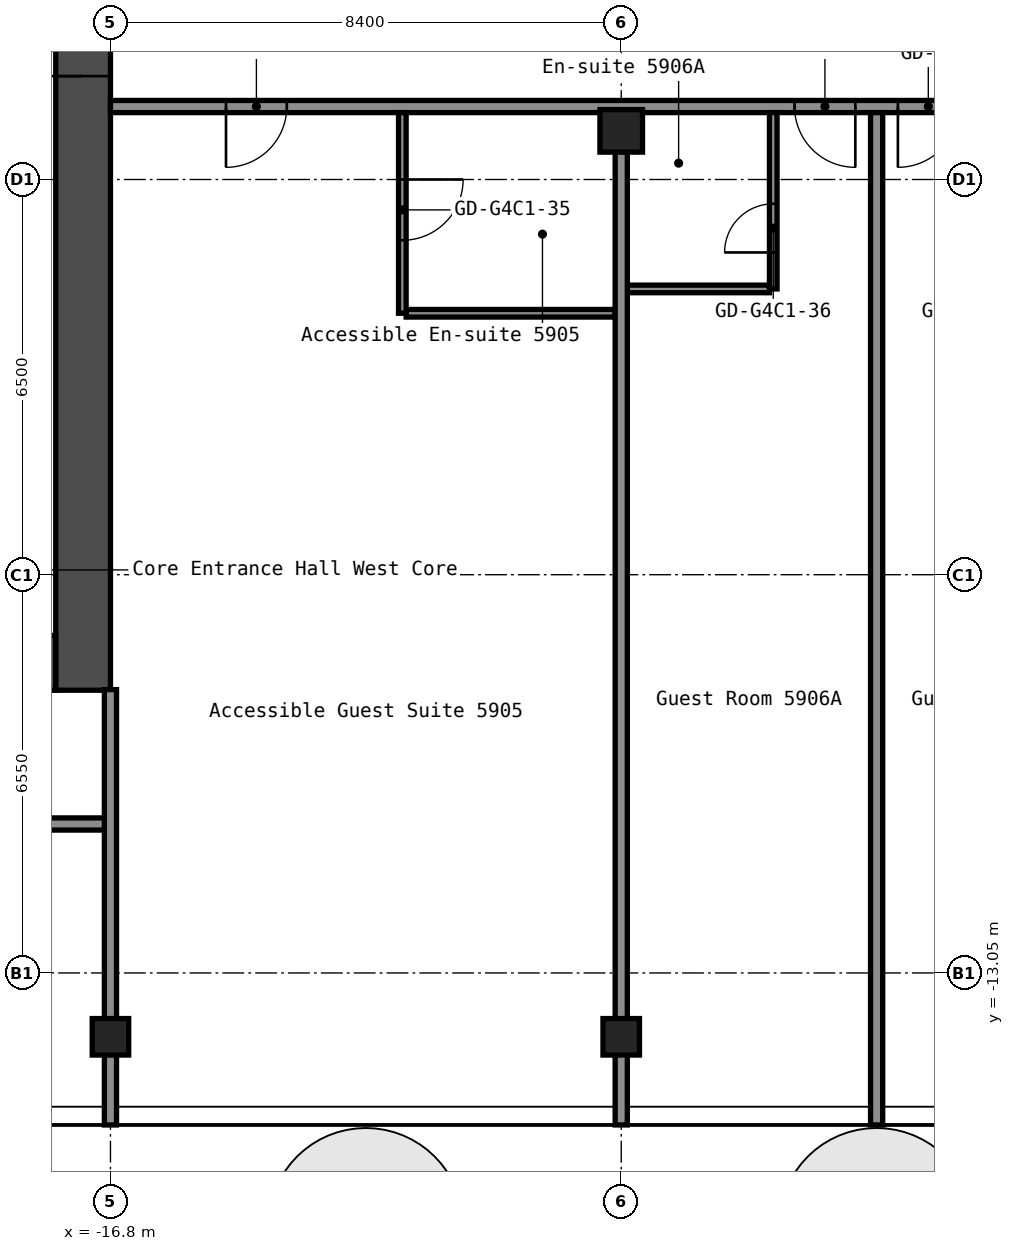
"""IFC4 building model, lengths in metres.
Left out: names, types, materials, properties, quantities, classifications, styles, units other than length and angle.
Written with IfcOpenShell. Run it as: python <this file> out.ifc"""

import sys

from ifc_helpers import new_model, si_unit, direction, frame, frame_2d, origin, origin_2d, place, context, subcontext, project, spatial, rectangle, hollow_rectangle, extrude, element, fill, save


model = new_model("IFC4")
c1 = context("Model", 3, precision=1e-05, world=origin(), true_north=direction((0.0, 1.0)))
c2 = subcontext(c1, "Body", "Model", "MODEL_VIEW")
j1 = project(units=[si_unit("LENGTHUNIT", "METRE"), si_unit("PLANEANGLEUNIT", "RADIAN")], contexts=[c1])
p1 = place(None, origin())
s1 = spatial("IfcSite", under=j1, at=p1, CompositionType="ELEMENT")
p2 = place(p1, origin())
s2 = spatial("IfcBuilding", under=s1, at=p2, CompositionType="ELEMENT")
p3 = place(p2, frame((0.0, 0.0, 209.0)))
s3 = spatial("IfcBuildingStorey", under=s2, at=p3, CompositionType="ELEMENT", Elevation=209.0)
for number, where, z_axis, x_axis in (
    (1, (-16.8, -14.1, 0.0), (0.0, 0.0, 1.0), (1.0, 0.0, 0.0)),
    (2, (-8.4, -14.1, 0.0), (0.0, 0.0, 1.0), (1.0, 0.0, 0.0)),
):
    element("IfcColumn", number, at=place(p3, frame(where, z_axis=z_axis, x_axis=x_axis)), inside=s3, PredefinedType="COLUMN", context=c2, shape_type="SweptSolid", body=[
        extrude(hollow_rectangle(XDim=0.6, YDim=0.6, WallThickness=0.025, InnerFilletRadius=0.038, OuterFilletRadius=0.062, at=origin_2d()), origin(), (0.0, 0.0, 1.0), 2.75),
    ])
p4 = place(p3, frame((-8.4, 0.8, 0.0), z_axis=(0.0, 0.0, 1.0), x_axis=(1.0, 0.0, 0.0)))
e3 = element("IfcColumn", 3, at=p4, inside=s3, PredefinedType="COLUMN", context=c2, shape_type="SweptSolid", body=[
    extrude(hollow_rectangle(XDim=0.7, YDim=0.7, WallThickness=0.028, at=origin_2d()), origin(), (0.0, 0.0, 1.0), 2.75),
])
p5 = place(p3, frame((-17.25, -8.4, 0.0), z_axis=(0.0, 0.0, 1.0), x_axis=(0.0, 1.0, 0.0)))
e4 = element("IfcWall", 4, at=p5, inside=s3, PredefinedType="SHEAR", context=c2, shape_type="SweptSolid", body=[
    extrude(rectangle(XDim=16.8, YDim=0.9, at=frame_2d((8.4, 0.0))), origin(), (0.0, 0.0, 1.0), 2.75),
])
p6 = place(p5, frame((10.1, 0.0, 0.0)))
e5 = element("IfcOpeningElement", 5, at=p6, cuts=e4, PredefinedType="OPENING", context=c2, shape_type="SweptSolid", body=[
    extrude(rectangle(XDim=1.6, YDim=2.1, at=frame_2d((0.8, 1.05))), frame((0.0, 0.46, 0.0), z_axis=(0.0, -1.0, 0.0), x_axis=(1.0, 0.0, 0.0)), (0.0, 0.0, 1.0), 0.92),
])
p7 = place(p3, frame((-32.7, -7.95, 0.0), z_axis=(0.0, 0.0, 1.0), x_axis=(1.0, 0.0, 0.0)))
e6 = element("IfcWall", 6, at=p7, inside=s3, PredefinedType="SHEAR", context=c2, shape_type="SweptSolid", body=[
    extrude(rectangle(XDim=15.0, YDim=0.9, at=frame_2d((7.5, 0.0))), origin(), (0.0, 0.0, 1.0), 2.75),
])
p8 = place(p7, frame((11.45, 0.0, 0.0)))
e7 = element("IfcOpeningElement", 7, at=p8, cuts=e6, PredefinedType="OPENING", context=c2, shape_type="SweptSolid", body=[
    extrude(rectangle(XDim=1.0, YDim=2.1, at=frame_2d((0.5, 1.05))), frame((0.0, 0.46, 0.0), z_axis=(0.0, -1.0, 0.0), x_axis=(1.0, 0.0, 0.0)), (0.0, 0.0, 1.0), 0.92),
])
p9 = place(p3, frame((-38.1, -10.6, 0.0), z_axis=(0.0, 0.0, 1.0), x_axis=(1.0, 0.0, 0.0)))
e8 = element("IfcWall", 8, at=p9, inside=s3, PredefinedType="PARTITIONING", context=c2, shape_type="SweptSolid", body=[
    extrude(rectangle(XDim=21.3, YDim=0.2, at=frame_2d((10.65, 0.0))), origin(), (0.0, 0.0, 1.0), 2.75),
])
p10 = place(p9, frame((1.95, 0.0, 0.0)))
e9 = element("IfcOpeningElement", 9, at=p10, cuts=e8, PredefinedType="OPENING", context=c2, shape_type="SweptSolid", body=[
    extrude(rectangle(XDim=0.9, YDim=2.1, at=frame_2d((0.45, 1.05))), frame((0.0, 0.11, 0.0), z_axis=(0.0, -1.0, 0.0), x_axis=(1.0, 0.0, 0.0)), (0.0, 0.0, 1.0), 0.22),
])
p11 = place(p9, frame((5.56, 0.0, 0.0)))
e10 = element("IfcOpeningElement", 10, at=p11, cuts=e8, PredefinedType="OPENING", context=c2, shape_type="SweptSolid", body=[
    extrude(rectangle(XDim=0.9, YDim=2.1, at=frame_2d((0.45, 1.05))), frame((0.0, 0.11, 0.0), z_axis=(0.0, -1.0, 0.0), x_axis=(1.0, 0.0, 0.0)), (0.0, 0.0, 1.0), 0.22),
])
p12 = place(p9, frame((9.76, 0.0, 0.0)))
e11 = element("IfcOpeningElement", 11, at=p12, cuts=e8, PredefinedType="OPENING", context=c2, shape_type="SweptSolid", body=[
    extrude(rectangle(XDim=0.9, YDim=2.1, at=frame_2d((0.45, 1.05))), frame((0.0, 0.11, 0.0), z_axis=(0.0, -1.0, 0.0), x_axis=(1.0, 0.0, 0.0)), (0.0, 0.0, 1.0), 0.22),
])
p13 = place(p9, frame((16.6, 0.0, 0.0)))
e12 = element("IfcOpeningElement", 12, at=p13, cuts=e8, PredefinedType="OPENING", context=c2, shape_type="SweptSolid", body=[
    extrude(rectangle(XDim=1.0, YDim=2.1, at=frame_2d((0.5, 1.05))), frame((0.0, 0.11, 0.0), z_axis=(0.0, -1.0, 0.0), x_axis=(1.0, 0.0, 0.0)), (0.0, 0.0, 1.0), 0.22),
])
p14 = place(p3, frame((-11.938, -2.2, 0.0), z_axis=(0.0, 0.0, 1.0), x_axis=(1.0, 0.0, 0.0)))
e13 = element("IfcWall", 13, at=p14, inside=s3, PredefinedType="PARTITIONING", context=c2, shape_type="SweptSolid", body=[
    extrude(rectangle(XDim=3.438, YDim=0.125, at=frame_2d((1.719, 0.0))), origin(), (0.0, 0.0, 1.0), 2.75),
])
p15 = place(p3, frame((-8.3, -1.8, 0.0), z_axis=(0.0, 0.0, 1.0), x_axis=(1.0, 0.0, 0.0)))
e14 = element("IfcWall", 14, at=p15, inside=s3, PredefinedType="PARTITIONING", context=c2, shape_type="SweptSolid", body=[
    extrude(rectangle(XDim=2.338, YDim=0.125, at=frame_2d((1.169, 0.0))), origin(), (0.0, 0.0, 1.0), 2.75),
])
p16 = place(p3, frame((-16.8, 1.2, 0.0), z_axis=(0.0, 0.0, 1.0), x_axis=(1.0, 0.0, 0.0)))
e15 = element("IfcWall", 15, at=p16, inside=s3, PredefinedType="PARTITIONING", context=c2, shape_type="SweptSolid", body=[
    extrude(rectangle(XDim=33.6, YDim=0.2, at=frame_2d((16.8, 0.0))), origin(), (0.0, 0.0, 1.0), 2.75),
])
p17 = place(p16, frame((1.9, 0.0, 0.0)))
e16 = element("IfcOpeningElement", 16, at=p17, cuts=e15, PredefinedType="OPENING", context=c2, shape_type="SweptSolid", body=[
    extrude(rectangle(XDim=1.0, YDim=2.1, at=frame_2d((0.5, 1.05))), frame((0.0, 0.11, 0.0), z_axis=(0.0, -1.0, 0.0), x_axis=(1.0, 0.0, 0.0)), (0.0, 0.0, 1.0), 0.22),
])
p18 = place(p16, frame((11.25, 0.0, 0.0)))
e17 = element("IfcOpeningElement", 17, at=p18, cuts=e15, PredefinedType="OPENING", context=c2, shape_type="SweptSolid", body=[
    extrude(rectangle(XDim=1.0, YDim=2.1, at=frame_2d((0.5, 1.05))), frame((0.0, 0.11, 0.0), z_axis=(0.0, -1.0, 0.0), x_axis=(1.0, 0.0, 0.0)), (0.0, 0.0, 1.0), 0.22),
])
p19 = place(p16, frame((12.95, 0.0, 0.0)))
e18 = element("IfcOpeningElement", 18, at=p19, cuts=e15, PredefinedType="OPENING", context=c2, shape_type="SweptSolid", body=[
    extrude(rectangle(XDim=1.0, YDim=2.1, at=frame_2d((0.5, 1.05))), frame((0.0, 0.11, 0.0), z_axis=(0.0, -1.0, 0.0), x_axis=(1.0, 0.0, 0.0)), (0.0, 0.0, 1.0), 0.22),
])
p20 = place(p16, frame((19.04, 0.0, 0.0)))
e19 = element("IfcOpeningElement", 19, at=p20, cuts=e15, PredefinedType="OPENING", context=c2, shape_type="SweptSolid", body=[
    extrude(rectangle(XDim=0.9, YDim=2.1, at=frame_2d((0.45, 1.05))), frame((0.0, 0.11, 0.0), z_axis=(0.0, -1.0, 0.0), x_axis=(1.0, 0.0, 0.0)), (0.0, 0.0, 1.0), 0.22),
])
p21 = place(p16, frame((23.24, 0.0, 0.0)))
e20 = element("IfcOpeningElement", 20, at=p21, cuts=e15, PredefinedType="OPENING", context=c2, shape_type="SweptSolid", body=[
    extrude(rectangle(XDim=0.9, YDim=2.1, at=frame_2d((0.45, 1.05))), frame((0.0, 0.11, 0.0), z_axis=(0.0, -1.0, 0.0), x_axis=(1.0, 0.0, 0.0)), (0.0, 0.0, 1.0), 0.22),
])
p22 = place(p16, frame((28.05, 0.0, 0.0)))
e21 = element("IfcOpeningElement", 21, at=p22, cuts=e15, PredefinedType="OPENING", context=c2, shape_type="SweptSolid", body=[
    extrude(rectangle(XDim=1.0, YDim=2.1, at=frame_2d((0.5, 1.05))), frame((0.0, 0.11, 0.0), z_axis=(0.0, -1.0, 0.0), x_axis=(1.0, 0.0, 0.0)), (0.0, 0.0, 1.0), 0.22),
])
p23 = place(p16, frame((29.75, 0.0, 0.0)))
e22 = element("IfcOpeningElement", 22, at=p23, cuts=e15, PredefinedType="OPENING", context=c2, shape_type="SweptSolid", body=[
    extrude(rectangle(XDim=1.0, YDim=2.1, at=frame_2d((0.5, 1.05))), frame((0.0, 0.11, 0.0), z_axis=(0.0, -1.0, 0.0), x_axis=(1.0, 0.0, 0.0)), (0.0, 0.0, 1.0), 0.22),
])
p24 = place(p3, frame((-16.8, -15.55, 0.0), z_axis=(0.0, 0.0, 1.0), x_axis=(0.0, 1.0, 0.0)))
e23 = element("IfcWall", 23, at=p24, inside=s3, PredefinedType="PARTITIONING", context=c2, shape_type="SweptSolid", body=[
    extrude(rectangle(XDim=7.16, YDim=0.2, at=frame_2d((3.58, 0.0))), origin(), (0.0, 0.0, 1.0), 2.75),
])
p25 = place(p3, frame((-12.0, -2.2, 0.0), z_axis=(0.0, 0.0, 1.0), x_axis=(0.0, 1.0, 0.0)))
e24 = element("IfcWall", 24, at=p25, inside=s3, PredefinedType="PARTITIONING", context=c2, shape_type="SweptSolid", body=[
    extrude(rectangle(XDim=3.3, YDim=0.125, at=frame_2d((1.65, 0.0))), origin(), (0.0, 0.0, 1.0), 2.75),
])
p26 = place(p25, frame((1.2, 0.0, 0.0)))
e25 = element("IfcOpeningElement", 25, at=p26, cuts=e24, PredefinedType="OPENING", context=c2, shape_type="SweptSolid", body=[
    extrude(rectangle(XDim=1.0, YDim=2.1, at=frame_2d((0.5, 1.05))), frame((0.0, 0.073, 0.0), z_axis=(0.0, -1.0, 0.0), x_axis=(1.0, 0.0, 0.0)), (0.0, 0.0, 1.0), 0.145),
])
p27 = place(p3, frame((-8.4, -15.55, 0.0), z_axis=(0.0, 0.0, 1.0), x_axis=(0.0, 1.0, 0.0)))
e26 = element("IfcWall", 26, at=p27, inside=s3, PredefinedType="PARTITIONING", context=c2, shape_type="SweptSolid", body=[
    extrude(rectangle(XDim=16.01, YDim=0.2, at=frame_2d((8.005, 0.0))), origin(), (0.0, 0.0, 1.0), 2.75),
])
p28 = place(p3, frame((-5.9, -1.8, 0.0), z_axis=(0.0, 0.0, 1.0), x_axis=(0.0, 1.0, 0.0)))
e27 = element("IfcWall", 27, at=p28, inside=s3, PredefinedType="PARTITIONING", context=c2, shape_type="SweptSolid", body=[
    extrude(rectangle(XDim=2.9, YDim=0.125, at=frame_2d((1.45, 0.0))), origin(), (0.0, 0.0, 1.0), 2.75),
])
p29 = place(p28, frame((0.6, 0.0, 0.0)))
e28 = element("IfcOpeningElement", 28, at=p29, cuts=e27, PredefinedType="OPENING", context=c2, shape_type="SweptSolid", body=[
    extrude(rectangle(XDim=0.8, YDim=2.1, at=frame_2d((0.4, 1.05))), frame((0.0, 0.073, 0.0), z_axis=(0.0, -1.0, 0.0), x_axis=(1.0, 0.0, 0.0)), (0.0, 0.0, 1.0), 0.145),
])
p30 = place(p3, frame((-4.2, -15.55, 0.0), z_axis=(0.0, 0.0, 1.0), x_axis=(0.0, 1.0, 0.0)))
e29 = element("IfcWall", 29, at=p30, inside=s3, PredefinedType="PARTITIONING", context=c2, shape_type="SweptSolid", body=[
    extrude(rectangle(XDim=16.65, YDim=0.2, at=frame_2d((8.325, 0.0))), origin(), (0.0, 0.0, 1.0), 2.75),
])
p31 = place(p6, origin())
e30 = element("IfcDoor", 30, at=p31, inside=s3, OperationType="DOUBLE_DOOR_SINGLE_SWING", PredefinedType="DOOR", context=c2, shape_type="SweptSolid", body=[
    extrude(rectangle(XDim=1.6, YDim=2.1, at=frame_2d((0.8, 1.05))), frame((0.0, 0.025, 0.0), z_axis=(0.0, -1.0, 0.0), x_axis=(1.0, 0.0, 0.0)), (0.0, 0.0, 1.0), 0.05),
])
fill(e5, e30)
p32 = place(p17, origin())
e31 = element("IfcDoor", 31, at=p32, inside=s3, OperationType="SINGLE_SWING_LEFT", PredefinedType="DOOR", context=c2, shape_type="SweptSolid", body=[
    extrude(rectangle(XDim=1.0, YDim=2.1, at=frame_2d((0.5, 1.05))), frame((0.0, 0.025, 0.0), z_axis=(0.0, -1.0, 0.0), x_axis=(1.0, 0.0, 0.0)), (0.0, 0.0, 1.0), 0.05),
])
fill(e16, e31)
p33 = place(p18, origin())
e32 = element("IfcDoor", 32, at=p33, inside=s3, OperationType="SINGLE_SWING_RIGHT", PredefinedType="DOOR", context=c2, shape_type="SweptSolid", body=[
    extrude(rectangle(XDim=1.0, YDim=2.1, at=frame_2d((0.5, 1.05))), frame((0.0, 0.025, 0.0), z_axis=(0.0, -1.0, 0.0), x_axis=(1.0, 0.0, 0.0)), (0.0, 0.0, 1.0), 0.05),
])
fill(e17, e32)
p34 = place(p19, origin())
e33 = element("IfcDoor", 33, at=p34, inside=s3, OperationType="SINGLE_SWING_LEFT", PredefinedType="DOOR", context=c2, shape_type="SweptSolid", body=[
    extrude(rectangle(XDim=1.0, YDim=2.1, at=frame_2d((0.5, 1.05))), frame((0.0, 0.025, 0.0), z_axis=(0.0, -1.0, 0.0), x_axis=(1.0, 0.0, 0.0)), (0.0, 0.0, 1.0), 0.05),
])
fill(e18, e33)
p35 = place(p26, origin())
e34 = element("IfcDoor", 34, at=p35, inside=s3, OperationType="SINGLE_SWING_RIGHT", PredefinedType="DOOR", context=c2, shape_type="SweptSolid", body=[
    extrude(rectangle(XDim=1.0, YDim=2.1, at=frame_2d((0.5, 1.05))), frame((0.0, 0.025, 0.0), z_axis=(0.0, -1.0, 0.0), x_axis=(1.0, 0.0, 0.0)), (0.0, 0.0, 1.0), 0.05),
])
fill(e25, e34)
p36 = place(p29, origin())
e35 = element("IfcDoor", 35, at=p36, inside=s3, OperationType="SINGLE_SWING_RIGHT", PredefinedType="DOOR", context=c2, shape_type="SweptSolid", body=[
    extrude(rectangle(XDim=0.8, YDim=2.1, at=frame_2d((0.4, 1.05))), frame((0.0, 0.025, 0.0), z_axis=(0.0, -1.0, 0.0), x_axis=(1.0, 0.0, 0.0)), (0.0, 0.0, 1.0), 0.05),
])
fill(e28, e35)
save(model, sys.argv[1])
